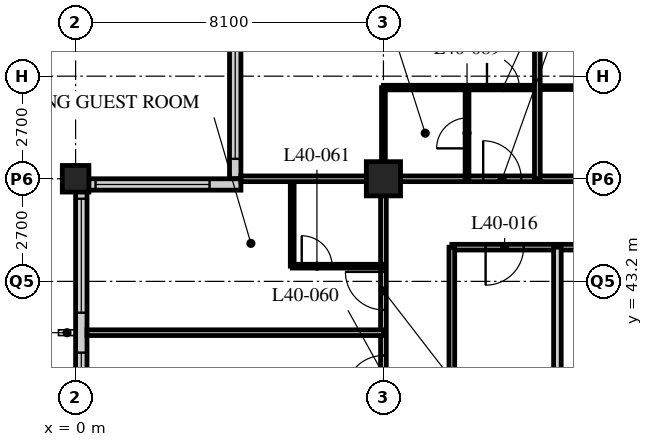
"""IFC4 building model, lengths in metres.
Left out: names, types, materials, properties, quantities, classifications, styles, units other than length and angle.
Written with IfcOpenShell. Run it as: python <this file> out.ifc"""

import sys

from ifc_helpers import new_model, si_unit, direction, frame, frame_2d, origin, origin_2d, place, context, subcontext, project, spatial, rectangle, hollow_rectangle, extrude, element, fill, save


model = new_model("IFC4")
c1 = context("Model", 3, precision=1e-05, world=origin(), true_north=direction((0.0, 1.0)))
c2 = subcontext(c1, "Body", "Model", "MODEL_VIEW")
j1 = project(units=[si_unit("LENGTHUNIT", "METRE"), si_unit("PLANEANGLEUNIT", "RADIAN")], contexts=[c1])
p1 = place(None, origin())
s1 = spatial("IfcSite", under=j1, at=p1, CompositionType="ELEMENT")
p2 = place(p1, origin())
s2 = spatial("IfcBuilding", under=s1, at=p2, CompositionType="ELEMENT")
p3 = place(p2, frame((0.0, 0.0, 154.4)))
s3 = spatial("IfcBuildingStorey", under=s2, at=p3, CompositionType="ELEMENT", Elevation=154.4)
p4 = place(p3, frame((0.0, 45.9, 0.0), z_axis=(0.0, 0.0, 1.0), x_axis=(1.0, 0.0, 0.0)))
e1 = element("IfcColumn", 1, at=p4, inside=s3, PredefinedType="COLUMN", context=c2, shape_type="SweptSolid", body=[
    extrude(hollow_rectangle(XDim=0.7, YDim=0.7, WallThickness=0.07, at=origin_2d()), origin(), (0.0, 0.0, 1.0), 3.4),
])
p5 = place(p3, frame((8.1, 45.9, 0.0), z_axis=(0.0, 0.0, 1.0), x_axis=(1.0, 0.0, 0.0)))
e2 = element("IfcColumn", 2, at=p5, inside=s3, PredefinedType="COLUMN", context=c2, shape_type="SweptSolid", body=[
    extrude(hollow_rectangle(XDim=0.9, YDim=0.9, WallThickness=0.1, at=origin_2d()), origin(), (0.0, 0.0, 1.0), 3.4),
])
p6 = place(p3, frame((4.2, 49.65, 0.0), z_axis=(0.0, 0.0, 1.0), x_axis=(0.0, -1.0, 0.0)))
e3 = element("IfcWall", 3, at=p6, inside=s3, PredefinedType="SOLIDWALL", context=c2, shape_type="SweptSolid", body=[
    extrude(rectangle(XDim=3.75, YDim=0.3, at=frame_2d((1.875, 0.0))), origin(), (0.0, 0.0, 1.0), 2.45),
])
p7 = place(p6, frame((0.225, 0.0, 0.9)))
e4 = element("IfcOpeningElement", 4, at=p7, cuts=e3, PredefinedType="OPENING", context=c2, shape_type="SweptSolid", body=[
    extrude(rectangle(XDim=3.0, YDim=1.2, at=frame_2d((1.5, 0.6))), frame((0.0, 0.16, 0.0), z_axis=(0.0, -1.0, 0.0), x_axis=(1.0, 0.0, 0.0)), (0.0, 0.0, 1.0), 0.32),
])
p8 = place(p3, frame((4.35, 45.75, 0.0), z_axis=(0.0, 0.0, 1.0), x_axis=(-1.0, 0.0, 0.0)))
e5 = element("IfcWall", 5, at=p8, inside=s3, PredefinedType="SOLIDWALL", context=c2, shape_type="SweptSolid", body=[
    extrude(rectangle(XDim=4.35, YDim=0.3, at=frame_2d((2.175, 0.0))), origin(), (0.0, 0.0, 1.0), 2.15),
])
p9 = place(p8, frame((0.825, 0.0, 0.9)))
e6 = element("IfcOpeningElement", 6, at=p9, cuts=e5, PredefinedType="OPENING", context=c2, shape_type="SweptSolid", body=[
    extrude(rectangle(XDim=3.0, YDim=1.2, at=frame_2d((1.5, 0.6))), frame((0.0, 0.16, 0.0), z_axis=(0.0, -1.0, 0.0), x_axis=(1.0, 0.0, 0.0)), (0.0, 0.0, 1.0), 0.32),
])
p10 = place(p3, frame((0.15, 45.6, 0.0), z_axis=(0.0, 0.0, 1.0), x_axis=(0.0, -1.0, 0.0)))
e7 = element("IfcWall", 7, at=p10, inside=s3, PredefinedType="SOLIDWALL", context=c2, shape_type="SweptSolid", body=[
    extrude(rectangle(XDim=32.1, YDim=0.3, at=frame_2d((16.05, 0.0))), origin(), (0.0, 0.0, 1.0), 2.15),
])
p11 = place(p10, frame((0.225, 0.0, 0.9)))
e8 = element("IfcOpeningElement", 8, at=p11, cuts=e7, PredefinedType="OPENING", context=c2, shape_type="SweptSolid", body=[
    extrude(rectangle(XDim=3.0, YDim=1.2, at=frame_2d((1.5, 0.6))), frame((0.0, 0.16, 0.0), z_axis=(0.0, -1.0, 0.0), x_axis=(1.0, 0.0, 0.0)), (0.0, 0.0, 1.0), 0.32),
])
p12 = place(p10, frame((4.275, 0.0, 0.9)))
e9 = element("IfcOpeningElement", 9, at=p12, cuts=e7, PredefinedType="OPENING", context=c2, shape_type="SweptSolid", body=[
    extrude(rectangle(XDim=3.0, YDim=1.2, at=frame_2d((1.5, 0.6))), frame((0.0, 0.16, 0.0), z_axis=(0.0, -1.0, 0.0), x_axis=(1.0, 0.0, 0.0)), (0.0, 0.0, 1.0), 0.32),
])
p13 = place(p10, frame((8.325, 0.0, 0.9)))
e10 = element("IfcOpeningElement", 10, at=p13, cuts=e7, PredefinedType="OPENING", context=c2, shape_type="SweptSolid", body=[
    extrude(rectangle(XDim=3.0, YDim=1.2, at=frame_2d((1.5, 0.6))), frame((0.0, 0.16, 0.0), z_axis=(0.0, -1.0, 0.0), x_axis=(1.0, 0.0, 0.0)), (0.0, 0.0, 1.0), 0.32),
])
p14 = place(p10, frame((12.375, 0.0, 0.9)))
e11 = element("IfcOpeningElement", 11, at=p14, cuts=e7, PredefinedType="OPENING", context=c2, shape_type="SweptSolid", body=[
    extrude(rectangle(XDim=3.0, YDim=1.2, at=frame_2d((1.5, 0.6))), frame((0.0, 0.16, 0.0), z_axis=(0.0, -1.0, 0.0), x_axis=(1.0, 0.0, 0.0)), (0.0, 0.0, 1.0), 0.32),
])
p15 = place(p10, frame((16.425, 0.0, 0.9)))
e12 = element("IfcOpeningElement", 12, at=p15, cuts=e7, PredefinedType="OPENING", context=c2, shape_type="SweptSolid", body=[
    extrude(rectangle(XDim=3.0, YDim=1.2, at=frame_2d((1.5, 0.6))), frame((0.0, 0.16, 0.0), z_axis=(0.0, -1.0, 0.0), x_axis=(1.0, 0.0, 0.0)), (0.0, 0.0, 1.0), 0.32),
])
p16 = place(p10, frame((20.475, 0.0, 0.9)))
e13 = element("IfcOpeningElement", 13, at=p16, cuts=e7, PredefinedType="OPENING", context=c2, shape_type="SweptSolid", body=[
    extrude(rectangle(XDim=3.0, YDim=1.2, at=frame_2d((1.5, 0.6))), frame((0.0, 0.16, 0.0), z_axis=(0.0, -1.0, 0.0), x_axis=(1.0, 0.0, 0.0)), (0.0, 0.0, 1.0), 0.32),
])
p17 = place(p10, frame((24.525, 0.0, 0.9)))
e14 = element("IfcOpeningElement", 14, at=p17, cuts=e7, PredefinedType="OPENING", context=c2, shape_type="SweptSolid", body=[
    extrude(rectangle(XDim=3.0, YDim=1.2, at=frame_2d((1.5, 0.6))), frame((0.0, 0.16, 0.0), z_axis=(0.0, -1.0, 0.0), x_axis=(1.0, 0.0, 0.0)), (0.0, 0.0, 1.0), 0.32),
])
p18 = place(p10, frame((28.575, 0.0, 0.9)))
e15 = element("IfcOpeningElement", 15, at=p18, cuts=e7, PredefinedType="OPENING", context=c2, shape_type="SweptSolid", body=[
    extrude(rectangle(XDim=3.0, YDim=1.2, at=frame_2d((1.5, 0.6))), frame((0.0, 0.16, 0.0), z_axis=(0.0, -1.0, 0.0), x_axis=(1.0, 0.0, 0.0)), (0.0, 0.0, 1.0), 0.32),
])
p19 = place(p3, frame((8.1, 45.9, 0.0), z_axis=(0.0, 0.0, 1.0), x_axis=(1.0, 0.0, 0.0)))
e16 = element("IfcWall", 16, at=p19, inside=s3, PredefinedType="PARTITIONING", context=c2, shape_type="SweptSolid", body=[
    extrude(rectangle(XDim=40.5, YDim=0.15, at=frame_2d((20.25, 0.0))), origin(), (0.0, 0.0, 1.0), 2.15),
])
p20 = place(p19, frame((9.625, 0.0, 0.0)))
e17 = element("IfcOpeningElement", 17, at=p20, cuts=e16, PredefinedType="OPENING", context=c2, shape_type="SweptSolid", body=[
    extrude(rectangle(XDim=1.0, YDim=2.1, at=frame_2d((0.5, 1.05))), frame((0.0, 0.085, 0.0), z_axis=(0.0, -1.0, 0.0), x_axis=(1.0, 0.0, 0.0)), (0.0, 0.0, 1.0), 0.17),
])
p21 = place(p19, frame((21.775, 0.0, 0.0)))
e18 = element("IfcOpeningElement", 18, at=p21, cuts=e16, PredefinedType="OPENING", context=c2, shape_type="SweptSolid", body=[
    extrude(rectangle(XDim=1.0, YDim=2.1, at=frame_2d((0.5, 1.05))), frame((0.0, 0.085, 0.0), z_axis=(0.0, -1.0, 0.0), x_axis=(1.0, 0.0, 0.0)), (0.0, 0.0, 1.0), 0.17),
])
p22 = place(p19, frame((28.95, 0.0, 0.0)))
e19 = element("IfcOpeningElement", 19, at=p22, cuts=e16, PredefinedType="OPENING", context=c2, shape_type="SweptSolid", body=[
    extrude(rectangle(XDim=1.0, YDim=2.1, at=frame_2d((0.5, 1.05))), frame((0.0, 0.085, 0.0), z_axis=(0.0, -1.0, 0.0), x_axis=(1.0, 0.0, 0.0)), (0.0, 0.0, 1.0), 0.17),
])
p23 = place(p19, frame((34.85, 0.0, 0.0)))
e20 = element("IfcOpeningElement", 20, at=p23, cuts=e16, PredefinedType="OPENING", context=c2, shape_type="SweptSolid", body=[
    extrude(rectangle(XDim=1.0, YDim=2.1, at=frame_2d((0.5, 1.05))), frame((0.0, 0.085, 0.0), z_axis=(0.0, -1.0, 0.0), x_axis=(1.0, 0.0, 0.0)), (0.0, 0.0, 1.0), 0.17),
])
p24 = place(p19, frame((36.875, 0.0, 0.0)))
e21 = element("IfcOpeningElement", 21, at=p24, cuts=e16, PredefinedType="OPENING", context=c2, shape_type="SweptSolid", body=[
    extrude(rectangle(XDim=1.0, YDim=2.1, at=frame_2d((0.5, 1.05))), frame((0.0, 0.085, 0.0), z_axis=(0.0, -1.0, 0.0), x_axis=(1.0, 0.0, 0.0)), (0.0, 0.0, 1.0), 0.17),
])
p25 = place(p19, frame((2.625, 0.0, 0.0)))
e22 = element("IfcOpeningElement", 22, at=p25, cuts=e16, PredefinedType="OPENING", context=c2, shape_type="SweptSolid", body=[
    extrude(rectangle(XDim=1.0, YDim=2.1, at=frame_2d((0.5, 1.05))), frame((0.0, 0.085, 0.0), z_axis=(0.0, -1.0, 0.0), x_axis=(1.0, 0.0, 0.0)), (0.0, 0.0, 1.0), 0.17),
])
p26 = place(p3, frame((8.1, 17.55, 0.0), z_axis=(0.0, 0.0, 1.0), x_axis=(0.0, 1.0, 0.0)))
e23 = element("IfcWall", 23, at=p26, inside=s3, PredefinedType="PARTITIONING", context=c2, shape_type="SweptSolid", body=[
    extrude(rectangle(XDim=28.35, YDim=0.15, at=frame_2d((14.175, 0.0))), origin(), (0.0, 0.0, 1.0), 2.15),
])
p27 = place(p26, frame((5.95, 0.0, 0.0)))
e24 = element("IfcOpeningElement", 24, at=p27, cuts=e23, PredefinedType="OPENING", context=c2, shape_type="SweptSolid", body=[
    extrude(rectangle(XDim=1.0, YDim=2.1, at=frame_2d((0.5, 1.05))), frame((0.0, 0.085, 0.0), z_axis=(0.0, -1.0, 0.0), x_axis=(1.0, 0.0, 0.0)), (0.0, 0.0, 1.0), 0.17),
])
p28 = place(p26, frame((16.8, 0.0, 0.0)))
e25 = element("IfcOpeningElement", 25, at=p28, cuts=e23, PredefinedType="OPENING", context=c2, shape_type="SweptSolid", body=[
    extrude(rectangle(XDim=1.0, YDim=2.1, at=frame_2d((0.5, 1.05))), frame((0.0, 0.085, 0.0), z_axis=(0.0, -1.0, 0.0), x_axis=(1.0, 0.0, 0.0)), (0.0, 0.0, 1.0), 0.17),
])
p29 = place(p26, frame((22.7, 0.0, 0.0)))
e26 = element("IfcOpeningElement", 26, at=p29, cuts=e23, PredefinedType="OPENING", context=c2, shape_type="SweptSolid", body=[
    extrude(rectangle(XDim=1.0, YDim=2.1, at=frame_2d((0.5, 1.05))), frame((0.0, 0.085, 0.0), z_axis=(0.0, -1.0, 0.0), x_axis=(1.0, 0.0, 0.0)), (0.0, 0.0, 1.0), 0.17),
])
p30 = place(p26, frame((24.9, 0.0, 0.0)))
e27 = element("IfcOpeningElement", 27, at=p30, cuts=e23, PredefinedType="OPENING", context=c2, shape_type="SweptSolid", body=[
    extrude(rectangle(XDim=1.0, YDim=2.1, at=frame_2d((0.5, 1.05))), frame((0.0, 0.085, 0.0), z_axis=(0.0, -1.0, 0.0), x_axis=(1.0, 0.0, 0.0)), (0.0, 0.0, 1.0), 0.17),
])
p31 = place(p3, frame((27.14, 44.1, 0.0), z_axis=(0.0, 0.0, 1.0), x_axis=(-1.0, 0.0, 0.0)))
e28 = element("IfcWall", 28, at=p31, inside=s3, PredefinedType="PARTITIONING", context=c2, shape_type="SweptSolid", body=[
    extrude(rectangle(XDim=17.24, YDim=0.15, at=frame_2d((8.62, 0.0))), origin(), (0.0, 0.0, 1.0), 3.15),
])
p32 = place(p31, frame((15.351, 0.0, 0.0)))
e29 = element("IfcOpeningElement", 29, at=p32, cuts=e28, PredefinedType="OPENING", context=c2, shape_type="SweptSolid", body=[
    extrude(rectangle(XDim=1.0, YDim=2.1, at=frame_2d((0.5, 1.05))), frame((0.0, 0.085, 0.0), z_axis=(0.0, -1.0, 0.0), x_axis=(1.0, 0.0, 0.0)), (0.0, 0.0, 1.0), 0.17),
])
p33 = place(p31, frame((12.201, 0.0, 0.0)))
e30 = element("IfcOpeningElement", 30, at=p33, cuts=e28, PredefinedType="OPENING", context=c2, shape_type="SweptSolid", body=[
    extrude(rectangle(XDim=1.0, YDim=2.1, at=frame_2d((0.5, 1.05))), frame((0.0, 0.085, 0.0), z_axis=(0.0, -1.0, 0.0), x_axis=(1.0, 0.0, 0.0)), (0.0, 0.0, 1.0), 0.17),
])
p34 = place(p31, frame((7.94, 0.0, 0.0)))
e31 = element("IfcOpeningElement", 31, at=p34, cuts=e28, PredefinedType="OPENING", context=c2, shape_type="SweptSolid", body=[
    extrude(rectangle(XDim=1.0, YDim=2.1, at=frame_2d((0.5, 1.05))), frame((0.0, 0.085, 0.0), z_axis=(0.0, -1.0, 0.0), x_axis=(1.0, 0.0, 0.0)), (0.0, 0.0, 1.0), 0.17),
])
p35 = place(p31, frame((2.465, 0.0, 0.0)))
e32 = element("IfcOpeningElement", 32, at=p35, cuts=e28, PredefinedType="OPENING", context=c2, shape_type="SweptSolid", body=[
    extrude(rectangle(XDim=1.0, YDim=2.1, at=frame_2d((0.5, 1.05))), frame((0.0, 0.085, 0.0), z_axis=(0.0, -1.0, 0.0), x_axis=(1.0, 0.0, 0.0)), (0.0, 0.0, 1.0), 0.17),
])
p36 = place(p3, frame((9.9, 44.1, 0.0), z_axis=(0.0, 0.0, 1.0), x_axis=(0.0, -1.0, 0.0)))
e33 = element("IfcWall", 33, at=p36, inside=s3, PredefinedType="PARTITIONING", context=c2, shape_type="SweptSolid", body=[
    extrude(rectangle(XDim=24.75, YDim=0.15, at=frame_2d((12.375, 0.0))), origin(), (0.0, 0.0, 1.0), 3.15),
])
p37 = place(p36, frame((17.871, 0.0, 0.0)))
e34 = element("IfcOpeningElement", 34, at=p37, cuts=e33, PredefinedType="OPENING", context=c2, shape_type="SweptSolid", body=[
    extrude(rectangle(XDim=1.0, YDim=2.1, at=frame_2d((0.5, 1.05))), frame((0.0, 0.085, 0.0), z_axis=(0.0, -1.0, 0.0), x_axis=(1.0, 0.0, 0.0)), (0.0, 0.0, 1.0), 0.17),
])
p38 = place(p36, frame((13.821, 0.0, 0.0)))
e35 = element("IfcOpeningElement", 35, at=p38, cuts=e33, PredefinedType="OPENING", context=c2, shape_type="SweptSolid", body=[
    extrude(rectangle(XDim=1.0, YDim=2.1, at=frame_2d((0.5, 1.05))), frame((0.0, 0.085, 0.0), z_axis=(0.0, -1.0, 0.0), x_axis=(1.0, 0.0, 0.0)), (0.0, 0.0, 1.0), 0.17),
])
p39 = place(p36, frame((10.4, 0.0, 0.0)))
e36 = element("IfcOpeningElement", 36, at=p39, cuts=e33, PredefinedType="OPENING", context=c2, shape_type="SweptSolid", body=[
    extrude(rectangle(XDim=1.0, YDim=2.1, at=frame_2d((0.5, 1.05))), frame((0.0, 0.085, 0.0), z_axis=(0.0, -1.0, 0.0), x_axis=(1.0, 0.0, 0.0)), (0.0, 0.0, 1.0), 0.17),
])
p40 = place(p36, frame((6.35, 0.0, 0.0)))
e37 = element("IfcOpeningElement", 37, at=p40, cuts=e33, PredefinedType="OPENING", context=c2, shape_type="SweptSolid", body=[
    extrude(rectangle(XDim=1.0, YDim=2.1, at=frame_2d((0.5, 1.05))), frame((0.0, 0.085, 0.0), z_axis=(0.0, -1.0, 0.0), x_axis=(1.0, 0.0, 0.0)), (0.0, 0.0, 1.0), 0.17),
])
p41 = place(p3, frame((12.678, 44.1, 0.0), z_axis=(0.0, 0.0, 1.0), x_axis=(0.0, -1.0, 0.0)))
e38 = element("IfcWall", 38, at=p41, inside=s3, PredefinedType="SOLIDWALL", context=c2, shape_type="SweptSolid", body=[
    extrude(rectangle(XDim=3.6, YDim=0.2, at=frame_2d((1.8, 0.0))), origin(), (0.0, 0.0, 1.0), 3.15),
])
p42 = place(p3, frame((12.15, 48.3, 0.0), z_axis=(0.0, 0.0, 1.0), x_axis=(1.0, 0.0, 0.0)))
e39 = element("IfcWall", 39, at=p42, inside=s3, PredefinedType="PARTITIONING", context=c2, shape_type="SweptSolid", body=[
    extrude(rectangle(XDim=2.6, YDim=0.1, at=frame_2d((1.3, 0.0))), origin(), (0.0, 0.0, 1.0), 3.15),
])
p43 = place(p3, frame((8.1, 41.85, 0.0), z_axis=(0.0, 0.0, 1.0), x_axis=(-1.0, 0.0, 0.0)))
e40 = element("IfcWall", 40, at=p43, inside=s3, PredefinedType="PARTITIONING", context=c2, shape_type="SweptSolid", body=[
    extrude(rectangle(XDim=7.8, YDim=0.15, at=frame_2d((3.9, 0.0))), origin(), (0.0, 0.0, 1.0), 3.15),
])
p44 = place(p3, frame((5.7, 43.6, 0.0), z_axis=(0.0, 0.0, 1.0), x_axis=(0.0, 1.0, 0.0)))
e41 = element("IfcWall", 41, at=p44, inside=s3, PredefinedType="PARTITIONING", context=c2, shape_type="SweptSolid", body=[
    extrude(rectangle(XDim=2.3, YDim=0.1, at=frame_2d((1.15, 0.0))), origin(), (0.0, 0.0, 1.0), 3.15),
])
p45 = place(p3, frame((8.1, 43.6, 0.0), z_axis=(0.0, 0.0, 1.0), x_axis=(-1.0, 0.0, 0.0)))
e42 = element("IfcWall", 42, at=p45, inside=s3, PredefinedType="PARTITIONING", context=c2, shape_type="SweptSolid", body=[
    extrude(rectangle(XDim=2.4, YDim=0.1, at=frame_2d((1.2, 0.0))), origin(), (0.0, 0.0, 1.0), 3.15),
])
p46 = place(p45, frame((1.35, 0.0, 0.0)))
e43 = element("IfcOpeningElement", 43, at=p46, cuts=e42, PredefinedType="OPENING", context=c2, shape_type="SweptSolid", body=[
    extrude(rectangle(XDim=0.8, YDim=2.1, at=frame_2d((0.4, 1.05))), frame((0.0, 0.06, 0.0), z_axis=(0.0, -1.0, 0.0), x_axis=(1.0, 0.0, 0.0)), (0.0, 0.0, 1.0), 0.12),
])
p47 = place(p3, frame((8.1, 48.3, 0.0), z_axis=(0.0, 0.0, 1.0), x_axis=(1.0, 0.0, 0.0)))
e44 = element("IfcWall", 44, at=p47, inside=s3, PredefinedType="PARTITIONING", context=c2, shape_type="SweptSolid", body=[
    extrude(rectangle(XDim=4.05, YDim=0.12, at=frame_2d((2.025, 0.0))), origin(), (0.0, 0.0, 1.0), 3.15),
])
p48 = place(p47, frame((2.725, 0.0, 0.0)))
e45 = element("IfcOpeningElement", 45, at=p48, cuts=e44, PredefinedType="OPENING", context=c2, shape_type="SweptSolid", body=[
    extrude(rectangle(XDim=0.85, YDim=2.1, at=frame_2d((0.425, 1.05))), frame((0.0, 0.07, 0.0), z_axis=(0.0, -1.0, 0.0), x_axis=(1.0, 0.0, 0.0)), (0.0, 0.0, 1.0), 0.14),
])
p49 = place(p3, frame((10.3, 45.9, 0.0), z_axis=(0.0, 0.0, 1.0), x_axis=(0.0, 1.0, 0.0)))
e46 = element("IfcWall", 46, at=p49, inside=s3, PredefinedType="PARTITIONING", context=c2, shape_type="SweptSolid", body=[
    extrude(rectangle(XDim=2.4, YDim=0.1, at=frame_2d((1.2, 0.0))), origin(), (0.0, 0.0, 1.0), 3.15),
])
p50 = place(p49, frame((0.8, 0.0, 0.0)))
e47 = element("IfcOpeningElement", 47, at=p50, cuts=e46, PredefinedType="OPENING", context=c2, shape_type="SweptSolid", body=[
    extrude(rectangle(XDim=0.8, YDim=2.1, at=frame_2d((0.4, 1.05))), frame((0.0, 0.06, 0.0), z_axis=(0.0, -1.0, 0.0), x_axis=(1.0, 0.0, 0.0)), (0.0, 0.0, 1.0), 0.12),
])
p51 = place(p3, frame((8.1, 45.9, 0.0), z_axis=(0.0, 0.0, 1.0), x_axis=(0.0, 1.0, 0.0)))
e48 = element("IfcWall", 48, at=p51, inside=s3, PredefinedType="PARTITIONING", context=c2, shape_type="SweptSolid", body=[
    extrude(rectangle(XDim=2.4, YDim=0.1, at=frame_2d((1.2, 0.0))), origin(), (0.0, 0.0, 1.0), 2.15),
])
p52 = place(p3, frame((4.35, 45.9, 0.0), z_axis=(0.0, 0.0, 1.0), x_axis=(1.0, 0.0, 0.0)))
e49 = element("IfcWall", 49, at=p52, inside=s3, PredefinedType="PARTITIONING", context=c2, shape_type="SweptSolid", body=[
    extrude(rectangle(XDim=3.75, YDim=0.15, at=frame_2d((1.875, 0.0))), origin(), (0.0, 0.0, 1.0), 2.15),
])
p53 = place(p3, frame((12.15, 45.9, 0.0), z_axis=(0.0, 0.0, 1.0), x_axis=(0.0, 1.0, 0.0)))
e50 = element("IfcWall", 50, at=p53, inside=s3, PredefinedType="PARTITIONING", context=c2, shape_type="SweptSolid", body=[
    extrude(rectangle(XDim=7.8, YDim=0.15, at=frame_2d((3.9, 0.0))), origin(), (0.0, 0.0, 1.0), 3.15),
])
p54 = place(p7, origin())
e51 = element("IfcWindow", 51, at=p54, inside=s3, PartitioningType="SINGLE_PANEL", PredefinedType="WINDOW", context=c2, shape_type="SweptSolid", body=[
    extrude(rectangle(XDim=3.0, YDim=1.2, at=frame_2d((1.5, 0.6))), frame((0.0, 0.03, 0.0), z_axis=(0.0, -1.0, 0.0), x_axis=(1.0, 0.0, 0.0)), (0.0, 0.0, 1.0), 0.06),
])
fill(e4, e51)
p55 = place(p9, origin())
e52 = element("IfcWindow", 52, at=p55, inside=s3, PartitioningType="SINGLE_PANEL", PredefinedType="WINDOW", context=c2, shape_type="SweptSolid", body=[
    extrude(rectangle(XDim=3.0, YDim=1.2, at=frame_2d((1.5, 0.6))), frame((0.0, 0.03, 0.0), z_axis=(0.0, -1.0, 0.0), x_axis=(1.0, 0.0, 0.0)), (0.0, 0.0, 1.0), 0.06),
])
fill(e6, e52)
p56 = place(p11, origin())
e53 = element("IfcWindow", 53, at=p56, inside=s3, PartitioningType="SINGLE_PANEL", PredefinedType="WINDOW", context=c2, shape_type="SweptSolid", body=[
    extrude(rectangle(XDim=3.0, YDim=1.2, at=frame_2d((1.5, 0.6))), frame((0.0, 0.03, 0.0), z_axis=(0.0, -1.0, 0.0), x_axis=(1.0, 0.0, 0.0)), (0.0, 0.0, 1.0), 0.06),
])
fill(e8, e53)
p57 = place(p12, origin())
e54 = element("IfcWindow", 54, at=p57, inside=s3, PartitioningType="SINGLE_PANEL", PredefinedType="WINDOW", context=c2, shape_type="SweptSolid", body=[
    extrude(rectangle(XDim=3.0, YDim=1.2, at=frame_2d((1.5, 0.6))), frame((0.0, 0.03, 0.0), z_axis=(0.0, -1.0, 0.0), x_axis=(1.0, 0.0, 0.0)), (0.0, 0.0, 1.0), 0.06),
])
fill(e9, e54)
p58 = place(p32, origin())
e55 = element("IfcDoor", 55, at=p58, inside=s3, OperationType="SINGLE_SWING_RIGHT", PredefinedType="DOOR", context=c2, shape_type="SweptSolid", body=[
    extrude(rectangle(XDim=1.0, YDim=2.1, at=frame_2d((0.5, 1.05))), frame((0.0, 0.025, 0.0), z_axis=(0.0, -1.0, 0.0), x_axis=(1.0, 0.0, 0.0)), (0.0, 0.0, 1.0), 0.05),
])
fill(e29, e55)
p59 = place(p29, origin())
e56 = element("IfcDoor", 56, at=p59, inside=s3, OperationType="SINGLE_SWING_LEFT", PredefinedType="DOOR", context=c2, shape_type="SweptSolid", body=[
    extrude(rectangle(XDim=1.0, YDim=2.1, at=frame_2d((0.5, 1.05))), frame((0.0, 0.025, 0.0), z_axis=(0.0, -1.0, 0.0), x_axis=(1.0, 0.0, 0.0)), (0.0, 0.0, 1.0), 0.05),
])
fill(e26, e56)
p60 = place(p46, origin())
e57 = element("IfcDoor", 57, at=p60, inside=s3, OperationType="SINGLE_SWING_LEFT", PredefinedType="DOOR", context=c2, shape_type="SweptSolid", body=[
    extrude(rectangle(XDim=0.8, YDim=2.1, at=frame_2d((0.4, 1.05))), frame((0.0, 0.025, 0.0), z_axis=(0.0, -1.0, 0.0), x_axis=(1.0, 0.0, 0.0)), (0.0, 0.0, 1.0), 0.05),
])
fill(e43, e57)
p61 = place(p30, origin())
e58 = element("IfcDoor", 58, at=p61, inside=s3, OperationType="SINGLE_SWING_RIGHT", PredefinedType="DOOR", context=c2, shape_type="SweptSolid", body=[
    extrude(rectangle(XDim=1.0, YDim=2.1, at=frame_2d((0.5, 1.05))), frame((0.0, 0.025, 0.0), z_axis=(0.0, -1.0, 0.0), x_axis=(1.0, 0.0, 0.0)), (0.0, 0.0, 1.0), 0.05),
])
fill(e27, e58)
p62 = place(p50, origin())
e59 = element("IfcDoor", 59, at=p62, inside=s3, OperationType="SINGLE_SWING_LEFT", PredefinedType="DOOR", context=c2, shape_type="SweptSolid", body=[
    extrude(rectangle(XDim=0.8, YDim=2.1, at=frame_2d((0.4, 1.05))), frame((0.0, 0.025, 0.0), z_axis=(0.0, -1.0, 0.0), x_axis=(1.0, 0.0, 0.0)), (0.0, 0.0, 1.0), 0.05),
])
fill(e47, e59)
p63 = place(p25, origin())
e60 = element("IfcDoor", 60, at=p63, inside=s3, OperationType="SINGLE_SWING_LEFT", PredefinedType="DOOR", context=c2, shape_type="SweptSolid", body=[
    extrude(rectangle(XDim=1.0, YDim=2.1, at=frame_2d((0.5, 1.05))), frame((0.0, 0.025, 0.0), z_axis=(0.0, -1.0, 0.0), x_axis=(1.0, 0.0, 0.0)), (0.0, 0.0, 1.0), 0.05),
])
fill(e22, e60)
p64 = place(p48, origin())
e61 = element("IfcDoor", 61, at=p64, inside=s3, OperationType="SINGLE_SWING_LEFT", PredefinedType="DOOR", context=c2, shape_type="SweptSolid", body=[
    extrude(rectangle(XDim=0.85, YDim=2.1, at=frame_2d((0.425, 1.05))), frame((0.0, 0.025, 0.0), z_axis=(0.0, -1.0, 0.0), x_axis=(1.0, 0.0, 0.0)), (0.0, 0.0, 1.0), 0.05),
])
fill(e45, e61)
save(model, sys.argv[1])
